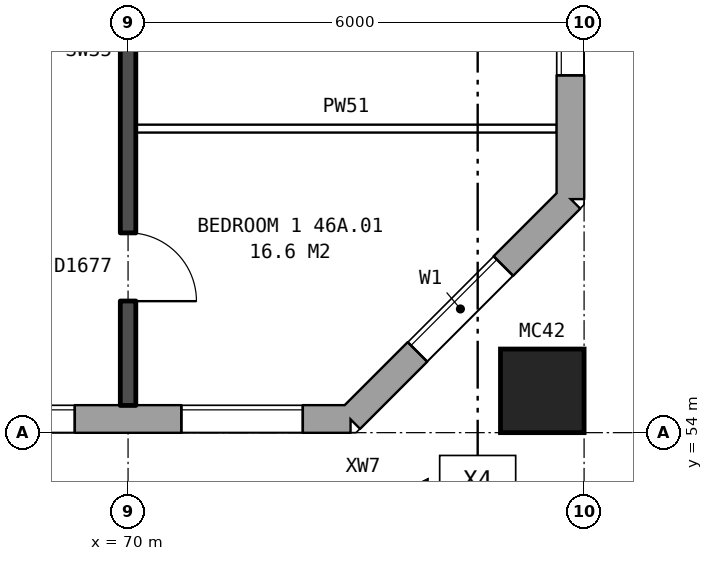
"""IFC4 building model, lengths in metres.
Left out: names, types, materials, properties, quantities, classifications, styles, units other than length and angle.
Written with IfcOpenShell. Run it as: python <this file> out.ifc"""

import sys

from ifc_helpers import new_model, si_unit, direction, frame, frame_2d, origin, origin_2d, place, context, subcontext, project, spatial, rectangle, hollow_rectangle, extrude, element, fill, save


model = new_model("IFC4")
c1 = context("Model", 3, precision=1e-05, world=origin(), true_north=direction((0.0, 1.0)))
c2 = subcontext(c1, "Body", "Model", "MODEL_VIEW")
j1 = project(units=[si_unit("LENGTHUNIT", "METRE"), si_unit("PLANEANGLEUNIT", "RADIAN")], contexts=[c1])
p1 = place(None, origin())
s1 = spatial("IfcSite", under=j1, at=p1, CompositionType="ELEMENT")
p2 = place(p1, origin())
s2 = spatial("IfcBuilding", under=s1, at=p2, CompositionType="ELEMENT")
p3 = place(p2, frame((0.0, 0.0, 164.0)))
s3 = spatial("IfcBuildingStorey", under=s2, at=p3, CompositionType="ELEMENT", Elevation=164.0)
p4 = place(p3, frame((75.45, 54.55, 0.0), z_axis=(0.0, 0.0, 1.0), x_axis=(1.0, 0.0, 0.0)))
e1 = element("IfcColumn", 1, at=p4, inside=s3, PredefinedType="COLUMN", context=c2, shape_type="SweptSolid", body=[
    extrude(hollow_rectangle(XDim=1.1, YDim=1.1, WallThickness=0.06, at=origin_2d()), origin(), (0.0, 0.0, 1.0), 3.1),
])
p5 = place(p3, frame((31.575, 54.18, 0.0), z_axis=(0.0, 0.0, 1.0), x_axis=(1.0, 0.0, 0.0)))
e2 = element("IfcWall", 2, at=p5, inside=s3, PredefinedType="STANDARD", context=c2, shape_type="SweptSolid", body=[
    extrude(rectangle(XDim=41.351, YDim=0.36, at=frame_2d((20.675, 0.0))), origin(), (0.0, 0.0, 1.0), 2.85),
])
p6 = place(p5, frame((3.125, 0.0, 0.8)))
e3 = element("IfcOpeningElement", 3, at=p6, cuts=e2, PredefinedType="OPENING", context=c2, shape_type="SweptSolid", body=[
    extrude(rectangle(XDim=1.6, YDim=1.8, at=frame_2d((0.8, 0.9))), frame((0.0, 0.19, 0.0), z_axis=(0.0, -1.0, 0.0), x_axis=(1.0, 0.0, 0.0)), (0.0, 0.0, 1.0), 0.38),
])
p7 = place(p5, frame((6.125, 0.0, 0.8)))
e4 = element("IfcOpeningElement", 4, at=p7, cuts=e2, PredefinedType="OPENING", context=c2, shape_type="SweptSolid", body=[
    extrude(rectangle(XDim=1.6, YDim=1.8, at=frame_2d((0.8, 0.9))), frame((0.0, 0.19, 0.0), z_axis=(0.0, -1.0, 0.0), x_axis=(1.0, 0.0, 0.0)), (0.0, 0.0, 1.0), 0.38),
])
p8 = place(p5, frame((9.125, 0.0, 0.8)))
e5 = element("IfcOpeningElement", 5, at=p8, cuts=e2, PredefinedType="OPENING", context=c2, shape_type="SweptSolid", body=[
    extrude(rectangle(XDim=1.6, YDim=1.8, at=frame_2d((0.8, 0.9))), frame((0.0, 0.19, 0.0), z_axis=(0.0, -1.0, 0.0), x_axis=(1.0, 0.0, 0.0)), (0.0, 0.0, 1.0), 0.38),
])
p9 = place(p5, frame((12.125, 0.0, 0.8)))
e6 = element("IfcOpeningElement", 6, at=p9, cuts=e2, PredefinedType="OPENING", context=c2, shape_type="SweptSolid", body=[
    extrude(rectangle(XDim=1.6, YDim=1.8, at=frame_2d((0.8, 0.9))), frame((0.0, 0.19, 0.0), z_axis=(0.0, -1.0, 0.0), x_axis=(1.0, 0.0, 0.0)), (0.0, 0.0, 1.0), 0.38),
])
p10 = place(p5, frame((15.125, 0.0, 0.8)))
e7 = element("IfcOpeningElement", 7, at=p10, cuts=e2, PredefinedType="OPENING", context=c2, shape_type="SweptSolid", body=[
    extrude(rectangle(XDim=1.6, YDim=1.8, at=frame_2d((0.8, 0.9))), frame((0.0, 0.19, 0.0), z_axis=(0.0, -1.0, 0.0), x_axis=(1.0, 0.0, 0.0)), (0.0, 0.0, 1.0), 0.38),
])
p11 = place(p5, frame((17.575, 0.0, 1.55)))
e8 = element("IfcOpeningElement", 8, at=p11, cuts=e2, PredefinedType="OPENING", context=c2, shape_type="SweptSolid", body=[
    extrude(rectangle(XDim=1.0, YDim=0.9, at=frame_2d((0.5, 0.45))), frame((0.0, 0.19, 0.0), z_axis=(0.0, -1.0, 0.0), x_axis=(1.0, 0.0, 0.0)), (0.0, 0.0, 1.0), 0.38),
])
p12 = place(p5, frame((20.625, 0.0, 0.25)))
e9 = element("IfcOpeningElement", 9, at=p12, cuts=e2, PredefinedType="OPENING", context=c2, shape_type="SweptSolid", body=[
    extrude(rectangle(XDim=0.6, YDim=1.5, at=frame_2d((0.3, 0.75))), frame((0.0, 0.19, 0.0), z_axis=(0.0, -1.0, 0.0), x_axis=(1.0, 0.0, 0.0)), (0.0, 0.0, 1.0), 0.38),
])
p13 = place(p5, frame((24.125, 0.0, 0.8)))
e10 = element("IfcOpeningElement", 10, at=p13, cuts=e2, PredefinedType="OPENING", context=c2, shape_type="SweptSolid", body=[
    extrude(rectangle(XDim=1.6, YDim=1.8, at=frame_2d((0.8, 0.9))), frame((0.0, 0.19, 0.0), z_axis=(0.0, -1.0, 0.0), x_axis=(1.0, 0.0, 0.0)), (0.0, 0.0, 1.0), 0.38),
])
p14 = place(p5, frame((27.125, 0.0, 0.8)))
e11 = element("IfcOpeningElement", 11, at=p14, cuts=e2, PredefinedType="OPENING", context=c2, shape_type="SweptSolid", body=[
    extrude(rectangle(XDim=1.6, YDim=1.8, at=frame_2d((0.8, 0.9))), frame((0.0, 0.19, 0.0), z_axis=(0.0, -1.0, 0.0), x_axis=(1.0, 0.0, 0.0)), (0.0, 0.0, 1.0), 0.38),
])
p15 = place(p5, frame((30.125, 0.0, 0.8)))
e12 = element("IfcOpeningElement", 12, at=p15, cuts=e2, PredefinedType="OPENING", context=c2, shape_type="SweptSolid", body=[
    extrude(rectangle(XDim=1.6, YDim=1.8, at=frame_2d((0.8, 0.9))), frame((0.0, 0.19, 0.0), z_axis=(0.0, -1.0, 0.0), x_axis=(1.0, 0.0, 0.0)), (0.0, 0.0, 1.0), 0.38),
])
p16 = place(p5, frame((33.125, 0.0, 0.8)))
e13 = element("IfcOpeningElement", 13, at=p16, cuts=e2, PredefinedType="OPENING", context=c2, shape_type="SweptSolid", body=[
    extrude(rectangle(XDim=1.6, YDim=1.8, at=frame_2d((0.8, 0.9))), frame((0.0, 0.19, 0.0), z_axis=(0.0, -1.0, 0.0), x_axis=(1.0, 0.0, 0.0)), (0.0, 0.0, 1.0), 0.38),
])
p17 = place(p5, frame((36.125, 0.0, 0.8)))
e14 = element("IfcOpeningElement", 14, at=p17, cuts=e2, PredefinedType="OPENING", context=c2, shape_type="SweptSolid", body=[
    extrude(rectangle(XDim=1.6, YDim=1.8, at=frame_2d((0.8, 0.9))), frame((0.0, 0.19, 0.0), z_axis=(0.0, -1.0, 0.0), x_axis=(1.0, 0.0, 0.0)), (0.0, 0.0, 1.0), 0.38),
])
p18 = place(p5, frame((39.125, 0.0, 0.8)))
e15 = element("IfcOpeningElement", 15, at=p18, cuts=e2, PredefinedType="OPENING", context=c2, shape_type="SweptSolid", body=[
    extrude(rectangle(XDim=1.6, YDim=1.8, at=frame_2d((0.8, 0.9))), frame((0.0, 0.19, 0.0), z_axis=(0.0, -1.0, 0.0), x_axis=(1.0, 0.0, 0.0)), (0.0, 0.0, 1.0), 0.38),
])
p19 = place(p5, frame((19.225, 0.0, 0.15)))
e16 = element("IfcOpeningElement", 16, at=p19, cuts=e2, PredefinedType="OPENING", context=c2, shape_type="SweptSolid", body=[
    extrude(rectangle(XDim=1.0, YDim=0.9, at=frame_2d((0.5, 0.45))), frame((0.0, 0.19, 0.0), z_axis=(0.0, -1.0, 0.0), x_axis=(1.0, 0.0, 0.0)), (0.0, 0.0, 1.0), 0.38),
])
p20 = place(p5, frame((21.525, 0.0, 0.15)))
e17 = element("IfcOpeningElement", 17, at=p20, cuts=e2, PredefinedType="OPENING", context=c2, shape_type="SweptSolid", body=[
    extrude(rectangle(XDim=0.6, YDim=0.9, at=frame_2d((0.3, 0.45))), frame((0.0, 0.19, 0.0), z_axis=(0.0, -1.0, 0.0), x_axis=(1.0, 0.0, 0.0)), (0.0, 0.0, 1.0), 0.38),
])
p21 = place(p5, frame((22.625, 0.0, 1.65)))
e18 = element("IfcOpeningElement", 18, at=p21, cuts=e2, PredefinedType="OPENING", context=c2, shape_type="SweptSolid", body=[
    extrude(rectangle(XDim=0.6, YDim=0.9, at=frame_2d((0.3, 0.45))), frame((0.0, 0.19, 0.0), z_axis=(0.0, -1.0, 0.0), x_axis=(1.0, 0.0, 0.0)), (0.0, 0.0, 1.0), 0.38),
])
p22 = place(p3, frame((72.925, 54.18, 0.0), z_axis=(0.0, 0.0, 1.0), x_axis=(0.707106781187, 0.707106781187, 0.0)))
e19 = element("IfcWall", 19, at=p22, inside=s3, PredefinedType="STANDARD", context=c2, shape_type="SweptSolid", body=[
    extrude(rectangle(XDim=4.094, YDim=0.36, at=frame_2d((2.047, 0.0))), origin(), (0.0, 0.0, 1.0), 2.85),
])
p23 = place(p22, frame((1.247, 0.0, 0.8)))
e20 = element("IfcOpeningElement", 20, at=p23, cuts=e19, PredefinedType="OPENING", context=c2, shape_type="SweptSolid", body=[
    extrude(rectangle(XDim=1.6, YDim=1.8, at=frame_2d((0.8, 0.9))), frame((0.0, 0.19, 0.0), z_axis=(0.0, -1.0, 0.0), x_axis=(1.0, 0.0, 0.0)), (0.0, 0.0, 1.0), 0.38),
])
p24 = place(p3, frame((75.82, 57.075, 0.0), z_axis=(0.0, 0.0, 1.0), x_axis=(0.0, 1.0, 0.0)))
e21 = element("IfcWall", 21, at=p24, inside=s3, PredefinedType="STANDARD", context=c2, shape_type="SweptSolid", body=[
    extrude(rectangle(XDim=25.851, YDim=0.36, at=frame_2d((12.925, 0.0))), origin(), (0.0, 0.0, 1.0), 2.85),
])
p25 = place(p24, frame((1.625, 0.0, 0.8)))
e22 = element("IfcOpeningElement", 22, at=p25, cuts=e21, PredefinedType="OPENING", context=c2, shape_type="SweptSolid", body=[
    extrude(rectangle(XDim=1.6, YDim=1.8, at=frame_2d((0.8, 0.9))), frame((0.0, 0.19, 0.0), z_axis=(0.0, -1.0, 0.0), x_axis=(1.0, 0.0, 0.0)), (0.0, 0.0, 1.0), 0.38),
])
p26 = place(p24, frame((4.625, 0.0, 0.8)))
e23 = element("IfcOpeningElement", 23, at=p26, cuts=e21, PredefinedType="OPENING", context=c2, shape_type="SweptSolid", body=[
    extrude(rectangle(XDim=1.6, YDim=1.8, at=frame_2d((0.8, 0.9))), frame((0.0, 0.19, 0.0), z_axis=(0.0, -1.0, 0.0), x_axis=(1.0, 0.0, 0.0)), (0.0, 0.0, 1.0), 0.38),
])
p27 = place(p24, frame((19.625, 0.0, 0.8)))
e24 = element("IfcOpeningElement", 24, at=p27, cuts=e21, PredefinedType="OPENING", context=c2, shape_type="SweptSolid", body=[
    extrude(rectangle(XDim=1.6, YDim=1.8, at=frame_2d((0.8, 0.9))), frame((0.0, 0.19, 0.0), z_axis=(0.0, -1.0, 0.0), x_axis=(1.0, 0.0, 0.0)), (0.0, 0.0, 1.0), 0.38),
])
p28 = place(p24, frame((22.625, 0.0, 0.8)))
e25 = element("IfcOpeningElement", 25, at=p28, cuts=e21, PredefinedType="OPENING", context=c2, shape_type="SweptSolid", body=[
    extrude(rectangle(XDim=1.6, YDim=1.8, at=frame_2d((0.8, 0.9))), frame((0.0, 0.19, 0.0), z_axis=(0.0, -1.0, 0.0), x_axis=(1.0, 0.0, 0.0)), (0.0, 0.0, 1.0), 0.38),
])
p29 = place(p3, frame((70.1, 58.0, 0.0), z_axis=(0.0, 0.0, 1.0), x_axis=(1.0, 0.0, 0.0)))
e26 = element("IfcWall", 26, at=p29, inside=s3, PredefinedType="PARTITIONING", context=c2, shape_type="SweptSolid", body=[
    extrude(rectangle(XDim=5.54, YDim=0.1, at=frame_2d((2.77, 0.0))), origin(), (0.0, 0.0, 1.0), 2.85),
])
p30 = place(p3, frame((70.0, 54.36, 0.0), z_axis=(0.0, 0.0, 1.0), x_axis=(0.0, 1.0, 0.0)))
e27 = element("IfcWall", 27, at=p30, inside=s3, PredefinedType="SOLIDWALL", context=c2, shape_type="SweptSolid", body=[
    extrude(rectangle(XDim=9.44, YDim=0.2, at=frame_2d((4.72, 0.0))), origin(), (0.0, 0.0, 1.0), 2.85),
])
p31 = place(p30, frame((1.37, 0.0, 0.0)))
e28 = element("IfcOpeningElement", 28, at=p31, cuts=e27, PredefinedType="OPENING", context=c2, shape_type="SweptSolid", body=[
    extrude(rectangle(XDim=0.9, YDim=2.1, at=frame_2d((0.45, 1.05))), frame((0.0, 0.11, 0.0), z_axis=(0.0, -1.0, 0.0), x_axis=(1.0, 0.0, 0.0)), (0.0, 0.0, 1.0), 0.22),
])
p32 = place(p30, frame((7.04, 0.0, 0.0)))
e29 = element("IfcOpeningElement", 29, at=p32, cuts=e27, PredefinedType="OPENING", context=c2, shape_type="SweptSolid", body=[
    extrude(rectangle(XDim=0.9, YDim=2.1, at=frame_2d((0.45, 1.05))), frame((0.0, 0.11, 0.0), z_axis=(0.0, -1.0, 0.0), x_axis=(1.0, 0.0, 0.0)), (0.0, 0.0, 1.0), 0.22),
])
p33 = place(p17, origin())
e30 = element("IfcWindow", 30, at=p33, inside=s3, PartitioningType="SINGLE_PANEL", PredefinedType="WINDOW", context=c2, shape_type="SweptSolid", body=[
    extrude(rectangle(XDim=1.6, YDim=1.8, at=frame_2d((0.8, 0.9))), frame((0.0, 0.15, 0.0), z_axis=(0.0, -1.0, 0.0), x_axis=(1.0, 0.0, 0.0)), (0.0, 0.0, 1.0), 0.06),
])
fill(e14, e30)
p34 = place(p18, origin())
e31 = element("IfcWindow", 31, at=p34, inside=s3, PartitioningType="SINGLE_PANEL", PredefinedType="WINDOW", context=c2, shape_type="SweptSolid", body=[
    extrude(rectangle(XDim=1.6, YDim=1.8, at=frame_2d((0.8, 0.9))), frame((0.0, 0.15, 0.0), z_axis=(0.0, -1.0, 0.0), x_axis=(1.0, 0.0, 0.0)), (0.0, 0.0, 1.0), 0.06),
])
fill(e15, e31)
p35 = place(p23, origin())
e32 = element("IfcWindow", 32, at=p35, inside=s3, PartitioningType="SINGLE_PANEL", PredefinedType="WINDOW", context=c2, shape_type="SweptSolid", body=[
    extrude(rectangle(XDim=1.6, YDim=1.8, at=frame_2d((0.8, 0.9))), frame((0.0, 0.15, 0.0), z_axis=(0.0, -1.0, 0.0), x_axis=(1.0, 0.0, 0.0)), (0.0, 0.0, 1.0), 0.06),
])
fill(e20, e32)
p36 = place(p25, origin())
e33 = element("IfcWindow", 33, at=p36, inside=s3, PartitioningType="SINGLE_PANEL", PredefinedType="WINDOW", context=c2, shape_type="SweptSolid", body=[
    extrude(rectangle(XDim=1.6, YDim=1.8, at=frame_2d((0.8, 0.9))), frame((0.0, 0.15, 0.0), z_axis=(0.0, -1.0, 0.0), x_axis=(1.0, 0.0, 0.0)), (0.0, 0.0, 1.0), 0.06),
])
fill(e22, e33)
p37 = place(p31, frame((0.9, 0.0, 0.0), z_axis=(0.0, 0.0, 1.0), x_axis=(-1.0, 0.0, 0.0)))
e34 = element("IfcDoor", 34, at=p37, inside=s3, OperationType="SINGLE_SWING_RIGHT", PredefinedType="DOOR", context=c2, shape_type="SweptSolid", body=[
    extrude(rectangle(XDim=0.9, YDim=2.1, at=frame_2d((0.45, 1.05))), frame((0.0, 0.025, 0.0), z_axis=(0.0, -1.0, 0.0), x_axis=(1.0, 0.0, 0.0)), (0.0, 0.0, 1.0), 0.05),
])
fill(e28, e34)
save(model, sys.argv[1])
